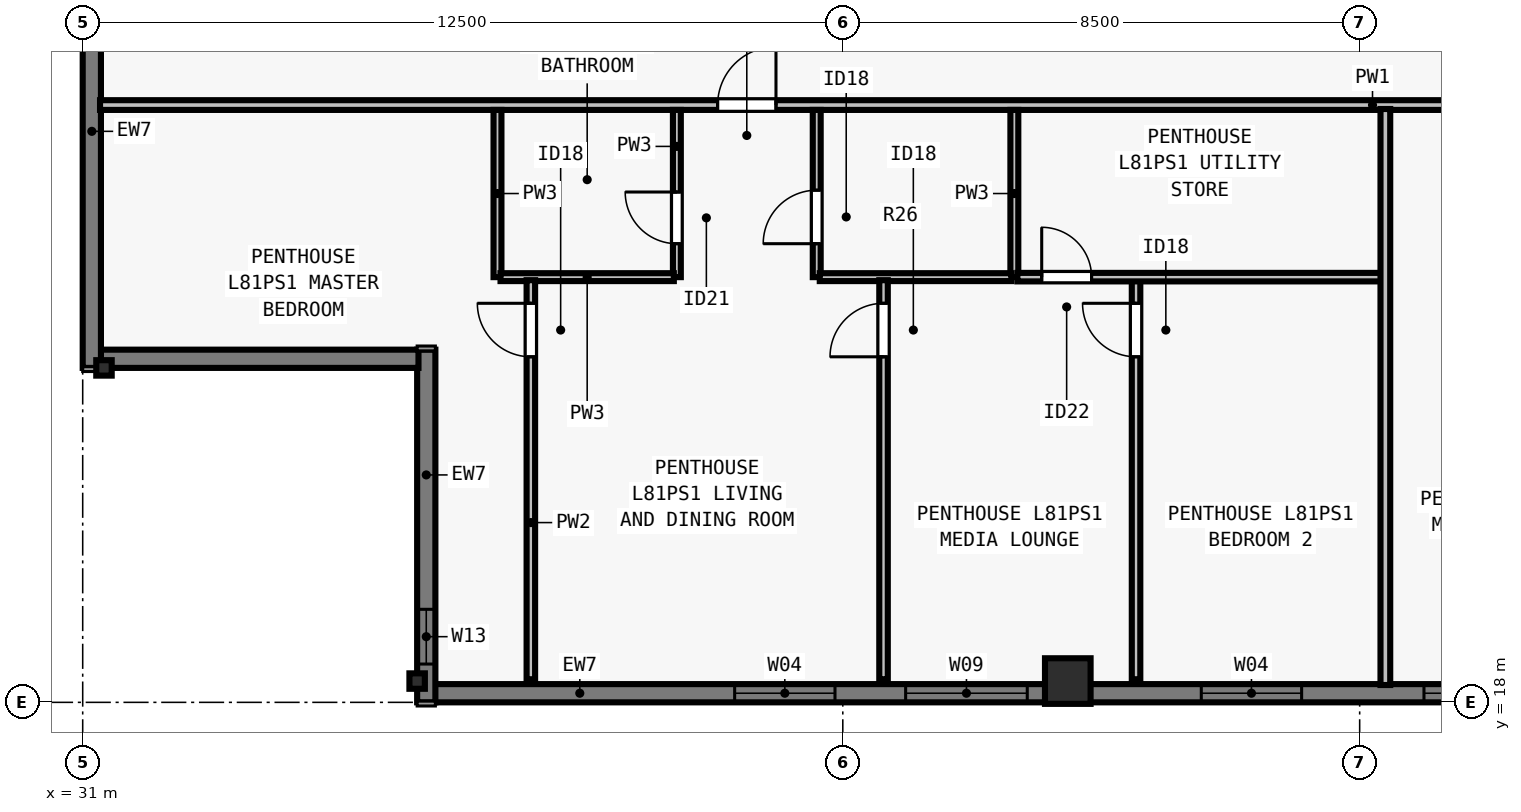
"""IFC4 building model, lengths in metres.
Left out: names, types, materials, properties, quantities, classifications, styles, units other than length and angle.
Written with IfcOpenShell. Run it as: python <this file> out.ifc"""

import sys

from ifc_helpers import new_model, si_unit, direction, frame, frame_2d, origin, origin_2d, place, context, subcontext, project, spatial, rectangle, i_section, extrude, element, fill, save


model = new_model("IFC4")
c1 = context("Model", 3, precision=1e-05, world=origin(), true_north=direction((0.0, 1.0)))
c2 = subcontext(c1, "Body", "Model", "MODEL_VIEW")
j1 = project(units=[si_unit("LENGTHUNIT", "METRE"), si_unit("PLANEANGLEUNIT", "RADIAN")], contexts=[c1])
p1 = place(None, origin())
s1 = spatial("IfcSite", under=j1, at=p1, CompositionType="ELEMENT")
p2 = place(p1, origin())
s2 = spatial("IfcBuilding", under=s1, at=p2, CompositionType="ELEMENT")
p3 = place(p2, frame((0.0, 0.0, 294.5)))
s3 = spatial("IfcBuildingStorey", under=s2, at=p3, CompositionType="ELEMENT", Elevation=294.5)
p4 = place(p3, frame((36.5, 18.35, 0.0), z_axis=(0.0, 0.0, 1.0), x_axis=(1.0, 0.0, 0.0)))
e1 = element("IfcColumn", 1, at=p4, inside=s3, PredefinedType="COLUMN", context=c2, shape_type="SweptSolid", body=[
    extrude(i_section(OverallWidth=0.254, OverallDepth=0.254, WebThickness=0.009, FlangeThickness=0.014, FilletRadius=0.013, at=origin_2d()), origin(), (0.0, 0.0, 1.0), 3.5),
])
p5 = place(p3, frame((47.2, 18.35, 0.0), z_axis=(0.0, 0.0, 1.0), x_axis=(1.0, 0.0, 0.0)))
e2 = element("IfcColumn", 2, at=p5, inside=s3, PredefinedType="COLUMN", context=c2, shape_type="SweptSolid", body=[
    extrude(rectangle(XDim=0.75, YDim=0.75, at=origin_2d()), origin(), (0.0, 0.0, 1.0), 3.5),
])
p6 = place(p3, frame((31.35, 23.5, 0.0), z_axis=(0.0, 0.0, 1.0), x_axis=(0.0, 1.0, 0.0)))
e3 = element("IfcColumn", 3, at=p6, inside=s3, PredefinedType="COLUMN", context=c2, shape_type="SweptSolid", body=[
    extrude(i_section(OverallWidth=0.254, OverallDepth=0.254, WebThickness=0.009, FlangeThickness=0.014, FilletRadius=0.013, at=origin_2d()), origin(), (0.0, 0.0, 1.0), 3.5),
])
p7 = place(p3, frame((67.5, 18.15, 0.0), z_axis=(0.0, 0.0, 1.0), x_axis=(-1.0, 0.0, 0.0)))
e4 = element("IfcWall", 4, at=p7, inside=s3, PredefinedType="SOLIDWALL", context=c2, shape_type="SweptSolid", body=[
    extrude(rectangle(XDim=30.722, YDim=0.3, at=frame_2d((15.361, 0.0))), origin(), (0.0, 0.0, 1.0), 3.29),
])
p8 = place(p7, frame((4.769, 0.0, 0.8)))
e5 = element("IfcOpeningElement", 5, at=p8, cuts=e4, PredefinedType="OPENING", context=c2, shape_type="SweptSolid", body=[
    extrude(rectangle(XDim=2.0, YDim=1.758, at=frame_2d((1.0, 0.879))), frame((0.0, 0.16, 0.0), z_axis=(0.0, -1.0, 0.0), x_axis=(1.0, 0.0, 0.0)), (0.0, 0.0, 1.0), 0.32),
])
p9 = place(p7, frame((8.331, 0.0, 0.8)))
e6 = element("IfcOpeningElement", 6, at=p9, cuts=e4, PredefinedType="OPENING", context=c2, shape_type="SweptSolid", body=[
    extrude(rectangle(XDim=1.65, YDim=1.758, at=frame_2d((0.825, 0.879))), frame((0.0, 0.16, 0.0), z_axis=(0.0, -1.0, 0.0), x_axis=(1.0, 0.0, 0.0)), (0.0, 0.0, 1.0), 0.32),
])
p10 = place(p7, frame((12.442, 0.0, 0.8)))
e7 = element("IfcOpeningElement", 7, at=p10, cuts=e4, PredefinedType="OPENING", context=c2, shape_type="SweptSolid", body=[
    extrude(rectangle(XDim=2.0, YDim=1.758, at=frame_2d((1.0, 0.879))), frame((0.0, 0.16, 0.0), z_axis=(0.0, -1.0, 0.0), x_axis=(1.0, 0.0, 0.0)), (0.0, 0.0, 1.0), 0.32),
])
p11 = place(p7, frame((16.455, 0.0, 0.8)))
e8 = element("IfcOpeningElement", 8, at=p11, cuts=e4, PredefinedType="OPENING", context=c2, shape_type="SweptSolid", body=[
    extrude(rectangle(XDim=1.65, YDim=1.758, at=frame_2d((0.825, 0.879))), frame((0.0, 0.16, 0.0), z_axis=(0.0, -1.0, 0.0), x_axis=(1.0, 0.0, 0.0)), (0.0, 0.0, 1.0), 0.32),
])
p12 = place(p7, frame((20.967, 0.0, 0.8)))
e9 = element("IfcOpeningElement", 9, at=p12, cuts=e4, PredefinedType="OPENING", context=c2, shape_type="SweptSolid", body=[
    extrude(rectangle(XDim=2.0, YDim=1.758, at=frame_2d((1.0, 0.879))), frame((0.0, 0.16, 0.0), z_axis=(0.0, -1.0, 0.0), x_axis=(1.0, 0.0, 0.0)), (0.0, 0.0, 1.0), 0.32),
])
p13 = place(p7, frame((24.128, 0.0, 0.8)))
e10 = element("IfcOpeningElement", 10, at=p13, cuts=e4, PredefinedType="OPENING", context=c2, shape_type="SweptSolid", body=[
    extrude(rectangle(XDim=1.65, YDim=1.758, at=frame_2d((0.825, 0.879))), frame((0.0, 0.16, 0.0), z_axis=(0.0, -1.0, 0.0), x_axis=(1.0, 0.0, 0.0)), (0.0, 0.0, 1.0), 0.32),
])
p14 = place(p3, frame((36.65, 18.0, 0.0), z_axis=(0.0, 0.0, 1.0), x_axis=(0.0, 1.0, 0.0)))
e11 = element("IfcWall", 11, at=p14, inside=s3, PredefinedType="SOLIDWALL", context=c2, shape_type="SweptSolid", body=[
    extrude(rectangle(XDim=5.8, YDim=0.3, at=frame_2d((2.9, 0.0))), origin(), (0.0, 0.0, 1.0), 3.29),
])
p15 = place(p14, frame((0.63, 0.0, 0.8)))
e12 = element("IfcOpeningElement", 12, at=p15, cuts=e11, PredefinedType="OPENING", context=c2, shape_type="SweptSolid", body=[
    extrude(rectangle(XDim=0.9, YDim=1.75, at=frame_2d((0.45, 0.875))), frame((0.0, 0.16, 0.0), z_axis=(0.0, -1.0, 0.0), x_axis=(1.0, 0.0, 0.0)), (0.0, 0.0, 1.0), 0.32),
])
p16 = place(p3, frame((36.522, 23.65, 0.0), z_axis=(0.0, 0.0, 1.0), x_axis=(-1.0, 0.0, 0.0)))
e13 = element("IfcWall", 13, at=p16, inside=s3, PredefinedType="SOLIDWALL", context=c2, shape_type="SweptSolid", body=[
    extrude(rectangle(XDim=5.244, YDim=0.3, at=frame_2d((2.622, 0.0))), origin(), (0.0, 0.0, 1.0), 3.29),
])
p17 = place(p3, frame((31.15, 23.5, 0.0), z_axis=(0.0, 0.0, 1.0), x_axis=(0.0, 1.0, 0.0)))
e14 = element("IfcWall", 14, at=p17, inside=s3, PredefinedType="SOLIDWALL", context=c2, shape_type="SweptSolid", body=[
    extrude(rectangle(XDim=30.722, YDim=0.3, at=frame_2d((15.361, 0.0))), origin(), (0.0, 0.0, 1.0), 3.29),
])
p18 = place(p17, frame((7.93, 0.0, 0.8)))
e15 = element("IfcOpeningElement", 15, at=p18, cuts=e14, PredefinedType="OPENING", context=c2, shape_type="SweptSolid", body=[
    extrude(rectangle(XDim=1.65, YDim=1.758, at=frame_2d((0.825, 0.879))), frame((0.0, 0.16, 0.0), z_axis=(0.0, -1.0, 0.0), x_axis=(1.0, 0.0, 0.0)), (0.0, 0.0, 1.0), 0.32),
])
p19 = place(p17, frame((12.442, 0.0, 0.8)))
e16 = element("IfcOpeningElement", 16, at=p19, cuts=e14, PredefinedType="OPENING", context=c2, shape_type="SweptSolid", body=[
    extrude(rectangle(XDim=2.0, YDim=1.758, at=frame_2d((1.0, 0.879))), frame((0.0, 0.16, 0.0), z_axis=(0.0, -1.0, 0.0), x_axis=(1.0, 0.0, 0.0)), (0.0, 0.0, 1.0), 0.32),
])
p20 = place(p17, frame((16.455, 0.0, 0.8)))
e17 = element("IfcOpeningElement", 17, at=p20, cuts=e14, PredefinedType="OPENING", context=c2, shape_type="SweptSolid", body=[
    extrude(rectangle(XDim=1.65, YDim=1.758, at=frame_2d((0.825, 0.879))), frame((0.0, 0.16, 0.0), z_axis=(0.0, -1.0, 0.0), x_axis=(1.0, 0.0, 0.0)), (0.0, 0.0, 1.0), 0.32),
])
p21 = place(p17, frame((20.967, 0.0, 0.8)))
e18 = element("IfcOpeningElement", 18, at=p21, cuts=e14, PredefinedType="OPENING", context=c2, shape_type="SweptSolid", body=[
    extrude(rectangle(XDim=2.0, YDim=1.758, at=frame_2d((1.0, 0.879))), frame((0.0, 0.16, 0.0), z_axis=(0.0, -1.0, 0.0), x_axis=(1.0, 0.0, 0.0)), (0.0, 0.0, 1.0), 0.32),
])
p22 = place(p17, frame((24.579, 0.0, 0.8)))
e19 = element("IfcOpeningElement", 19, at=p22, cuts=e14, PredefinedType="OPENING", context=c2, shape_type="SweptSolid", body=[
    extrude(rectangle(XDim=1.65, YDim=1.758, at=frame_2d((0.825, 0.879))), frame((0.0, 0.16, 0.0), z_axis=(0.0, -1.0, 0.0), x_axis=(1.0, 0.0, 0.0)), (0.0, 0.0, 1.0), 0.32),
])
p23 = place(p17, frame((27.11, 0.0, 0.8)))
e20 = element("IfcOpeningElement", 20, at=p23, cuts=e14, PredefinedType="OPENING", context=c2, shape_type="SweptSolid", body=[
    extrude(rectangle(XDim=0.9, YDim=1.75, at=frame_2d((0.45, 0.875))), frame((0.0, 0.16, 0.0), z_axis=(0.0, -1.0, 0.0), x_axis=(1.0, 0.0, 0.0)), (0.0, 0.0, 1.0), 0.32),
])
p24 = place(p3, frame((31.285, 27.823, 0.0), z_axis=(0.0, 0.0, 1.0), x_axis=(1.0, 0.0, 0.0)))
e21 = element("IfcWall", 21, at=p24, inside=s3, PredefinedType="PARTITIONING", context=c2, shape_type="SweptSolid", body=[
    extrude(rectangle(XDim=41.3, YDim=0.16, at=frame_2d((20.65, 0.0))), origin(), (0.0, 0.0, 1.0), 3.009),
])
p25 = place(p24, frame((10.156, 0.0, 0.0)))
e22 = element("IfcOpeningElement", 22, at=p25, cuts=e21, PredefinedType="OPENING", context=c2, shape_type="SweptSolid", body=[
    extrude(rectangle(XDim=0.96, YDim=2.18, at=frame_2d((0.48, 1.09))), frame((0.0, 0.09, 0.0), z_axis=(0.0, -1.0, 0.0), x_axis=(1.0, 0.0, 0.0)), (0.0, 0.0, 1.0), 0.18),
])
p26 = place(p24, frame((30.736, 0.0, 0.0)))
e23 = element("IfcOpeningElement", 23, at=p26, cuts=e21, PredefinedType="OPENING", context=c2, shape_type="SweptSolid", body=[
    extrude(rectangle(XDim=0.96, YDim=2.18, at=frame_2d((0.48, 1.09))), frame((0.0, 0.09, 0.0), z_axis=(0.0, -1.0, 0.0), x_axis=(1.0, 0.0, 0.0)), (0.0, 0.0, 1.0), 0.18),
])
p27 = place(p3, frame((37.821, 24.992, 0.0), z_axis=(0.0, 0.0, 1.0), x_axis=(0.0, 1.0, 0.0)))
e24 = element("IfcWall", 24, at=p27, inside=s3, PredefinedType="PLUMBINGWALL", context=c2, shape_type="SweptSolid", body=[
    extrude(rectangle(XDim=2.75, YDim=0.13, at=frame_2d((1.375, 0.0))), origin(), (0.0, 0.0, 1.0), 3.29),
])
p28 = place(p3, frame((40.771, 24.992, 0.0), z_axis=(0.0, 0.0, 1.0), x_axis=(0.0, 1.0, 0.0)))
e25 = element("IfcWall", 25, at=p28, inside=s3, PredefinedType="PLUMBINGWALL", context=c2, shape_type="SweptSolid", body=[
    extrude(rectangle(XDim=2.75, YDim=0.13, at=frame_2d((1.375, 0.0))), origin(), (0.0, 0.0, 1.0), 2.653),
])
p29 = place(p28, frame((0.55, 0.0, 0.0)))
e26 = element("IfcOpeningElement", 26, at=p29, cuts=e25, PredefinedType="OPENING", context=c2, shape_type="SweptSolid", body=[
    extrude(rectangle(XDim=0.85, YDim=2.08, at=frame_2d((0.425, 1.04))), frame((0.0, 0.075, 0.0), z_axis=(0.0, -1.0, 0.0), x_axis=(1.0, 0.0, 0.0)), (0.0, 0.0, 1.0), 0.15),
])
p30 = place(p3, frame((37.871, 24.992, 0.0), z_axis=(0.0, 0.0, 1.0), x_axis=(1.0, 0.0, 0.0)))
e27 = element("IfcWall", 27, at=p30, inside=s3, PredefinedType="PLUMBINGWALL", context=c2, shape_type="SweptSolid", body=[
    extrude(rectangle(XDim=2.85, YDim=0.13, at=frame_2d((1.425, 0.0))), origin(), (0.0, 0.0, 1.0), 3.29),
])
p31 = place(p3, frame((46.321, 24.992, 0.0), z_axis=(0.0, 0.0, 1.0), x_axis=(0.0, 1.0, 0.0)))
e28 = element("IfcWall", 28, at=p31, inside=s3, PredefinedType="PLUMBINGWALL", context=c2, shape_type="SweptSolid", body=[
    extrude(rectangle(XDim=2.75, YDim=0.13, at=frame_2d((1.375, 0.0))), origin(), (0.0, 0.0, 1.0), 3.29),
])
p32 = place(p3, frame((43.071, 24.992, 0.0), z_axis=(0.0, 0.0, 1.0), x_axis=(0.0, 1.0, 0.0)))
e29 = element("IfcWall", 29, at=p32, inside=s3, PredefinedType="PLUMBINGWALL", context=c2, shape_type="SweptSolid", body=[
    extrude(rectangle(XDim=2.75, YDim=0.13, at=frame_2d((1.375, 0.0))), origin(), (0.0, 0.0, 1.0), 3.29),
])
p33 = place(p32, frame((0.55, 0.0, 0.0)))
e30 = element("IfcOpeningElement", 30, at=p33, cuts=e29, PredefinedType="OPENING", context=c2, shape_type="SweptSolid", body=[
    extrude(rectangle(XDim=0.88, YDim=2.1, at=frame_2d((0.44, 1.05))), frame((0.0, 0.075, 0.0), z_axis=(0.0, -1.0, 0.0), x_axis=(1.0, 0.0, 0.0)), (0.0, 0.0, 1.0), 0.15),
])
p34 = place(p3, frame((43.121, 24.992, 0.0), z_axis=(0.0, 0.0, 1.0), x_axis=(1.0, 0.0, 0.0)))
e31 = element("IfcWall", 31, at=p34, inside=s3, PredefinedType="PLUMBINGWALL", context=c2, shape_type="SweptSolid", body=[
    extrude(rectangle(XDim=3.15, YDim=0.13, at=frame_2d((1.575, 0.0))), origin(), (0.0, 0.0, 1.0), 3.29),
])
p35 = place(p3, frame((38.37, 18.38, 0.0), z_axis=(0.0, 0.0, 1.0), x_axis=(0.0, 1.0, 0.0)))
e32 = element("IfcWall", 32, at=p35, inside=s3, PredefinedType="PARTITIONING", context=c2, shape_type="SweptSolid", body=[
    extrude(rectangle(XDim=6.562, YDim=0.14, at=frame_2d((3.281, 0.0))), origin(), (0.0, 0.0, 1.0), 2.653),
])
p36 = place(p35, frame((5.302, 0.0, 0.0)))
e33 = element("IfcOpeningElement", 33, at=p36, cuts=e32, PredefinedType="OPENING", context=c2, shape_type="SweptSolid", body=[
    extrude(rectangle(XDim=0.88, YDim=2.1, at=frame_2d((0.44, 1.05))), frame((0.0, 0.08, 0.0), z_axis=(0.0, -1.0, 0.0), x_axis=(1.0, 0.0, 0.0)), (0.0, 0.0, 1.0), 0.16),
])
p37 = place(p3, frame((48.323, 18.38, 0.0), z_axis=(0.0, 0.0, 1.0), x_axis=(0.0, 1.0, 0.0)))
e34 = element("IfcWall", 34, at=p37, inside=s3, PredefinedType="PARTITIONING", context=c2, shape_type="SweptSolid", body=[
    extrude(rectangle(XDim=6.653, YDim=0.14, at=frame_2d((3.326, 0.0))), origin(), (0.0, 0.0, 1.0), 3.009),
])
p38 = place(p37, frame((5.302, 0.0, 0.0)))
e35 = element("IfcOpeningElement", 35, at=p38, cuts=e34, PredefinedType="OPENING", context=c2, shape_type="SweptSolid", body=[
    extrude(rectangle(XDim=0.88, YDim=2.1, at=frame_2d((0.44, 1.05))), frame((0.0, 0.08, 0.0), z_axis=(0.0, -1.0, 0.0), x_axis=(1.0, 0.0, 0.0)), (0.0, 0.0, 1.0), 0.16),
])
p39 = place(p3, frame((46.371, 24.992, 0.0), z_axis=(0.0, 0.0, 1.0), x_axis=(1.0, 0.0, 0.0)))
e36 = element("IfcWall", 36, at=p39, inside=s3, PredefinedType="PARTITIONING", context=c2, shape_type="SweptSolid", body=[
    extrude(rectangle(XDim=6.101, YDim=0.14, at=frame_2d((3.051, 0.0))), origin(), (0.0, 0.0, 1.0), 3.29),
])
p40 = place(p39, frame((0.4, 0.0, 0.0)))
e37 = element("IfcOpeningElement", 37, at=p40, cuts=e36, PredefinedType="OPENING", context=c2, shape_type="SweptSolid", body=[
    extrude(rectangle(XDim=0.82, YDim=2.1, at=frame_2d((0.41, 1.05))), frame((0.0, 0.08, 0.0), z_axis=(0.0, -1.0, 0.0), x_axis=(1.0, 0.0, 0.0)), (0.0, 0.0, 1.0), 0.16),
])
p41 = place(p3, frame((44.17, 18.38, 0.0), z_axis=(0.0, 0.0, 1.0), x_axis=(0.0, 1.0, 0.0)))
e38 = element("IfcWall", 38, at=p41, inside=s3, PredefinedType="PARTITIONING", context=c2, shape_type="SweptSolid", body=[
    extrude(rectangle(XDim=6.562, YDim=0.14, at=frame_2d((3.281, 0.0))), origin(), (0.0, 0.0, 1.0), 3.29),
])
p42 = place(p41, frame((5.302, 0.0, 0.0)))
e39 = element("IfcOpeningElement", 39, at=p42, cuts=e38, PredefinedType="OPENING", context=c2, shape_type="SweptSolid", body=[
    extrude(rectangle(XDim=0.88, YDim=2.1, at=frame_2d((0.44, 1.05))), frame((0.0, 0.08, 0.0), z_axis=(0.0, -1.0, 0.0), x_axis=(1.0, 0.0, 0.0)), (0.0, 0.0, 1.0), 0.16),
])
p43 = place(p3, frame((52.423, 18.285, 0.0), z_axis=(0.0, 0.0, 1.0), x_axis=(0.0, 1.0, 0.0)))
e40 = element("IfcWall", 40, at=p43, inside=s3, PredefinedType="PARTITIONING", context=c2, shape_type="SweptSolid", body=[
    extrude(rectangle(XDim=9.473, YDim=0.16, at=frame_2d((4.736, 0.0))), origin(), (0.0, 0.0, 1.0), 3.009),
])
p44 = place(p10, origin())
e41 = element("IfcWindow", 41, at=p44, inside=s3, PartitioningType="SINGLE_PANEL", PredefinedType="WINDOW", context=c2, shape_type="SweptSolid", body=[
    extrude(rectangle(XDim=2.0, YDim=1.758, at=frame_2d((1.0, 0.879))), frame((0.0, -0.05, 0.0), z_axis=(0.0, -1.0, 0.0), x_axis=(1.0, 0.0, 0.0)), (0.0, 0.0, 1.0), 0.06),
])
fill(e7, e41)
p45 = place(p11, origin())
e42 = element("IfcWindow", 42, at=p45, inside=s3, PartitioningType="SINGLE_PANEL", PredefinedType="WINDOW", context=c2, shape_type="SweptSolid", body=[
    extrude(rectangle(XDim=1.65, YDim=1.758, at=frame_2d((0.825, 0.879))), frame((0.0, -0.05, 0.0), z_axis=(0.0, -1.0, 0.0), x_axis=(1.0, 0.0, 0.0)), (0.0, 0.0, 1.0), 0.06),
])
fill(e8, e42)
p46 = place(p12, origin())
e43 = element("IfcWindow", 43, at=p46, inside=s3, PartitioningType="SINGLE_PANEL", PredefinedType="WINDOW", context=c2, shape_type="SweptSolid", body=[
    extrude(rectangle(XDim=2.0, YDim=1.758, at=frame_2d((1.0, 0.879))), frame((0.0, -0.05, 0.0), z_axis=(0.0, -1.0, 0.0), x_axis=(1.0, 0.0, 0.0)), (0.0, 0.0, 1.0), 0.06),
])
fill(e9, e43)
p47 = place(p13, origin())
e44 = element("IfcWindow", 44, at=p47, inside=s3, PartitioningType="SINGLE_PANEL", PredefinedType="WINDOW", context=c2, shape_type="SweptSolid", body=[
    extrude(rectangle(XDim=1.65, YDim=1.758, at=frame_2d((0.825, 0.879))), frame((0.0, -0.05, 0.0), z_axis=(0.0, -1.0, 0.0), x_axis=(1.0, 0.0, 0.0)), (0.0, 0.0, 1.0), 0.06),
])
fill(e10, e44)
p48 = place(p15, origin())
e45 = element("IfcWindow", 45, at=p48, inside=s3, PartitioningType="SINGLE_PANEL", PredefinedType="WINDOW", context=c2, shape_type="SweptSolid", body=[
    extrude(rectangle(XDim=0.9, YDim=1.75, at=frame_2d((0.45, 0.875))), frame((0.0, -0.04, 0.0), z_axis=(0.0, -1.0, 0.0), x_axis=(1.0, 0.0, 0.0)), (0.0, 0.0, 1.0), 0.06),
])
fill(e12, e45)
p49 = place(p29, origin())
e46 = element("IfcDoor", 46, at=p49, inside=s3, OperationType="SINGLE_SWING_RIGHT", PredefinedType="DOOR", context=c2, shape_type="SweptSolid", body=[
    extrude(rectangle(XDim=0.85, YDim=2.08, at=frame_2d((0.425, 1.04))), frame((0.0, 0.025, 0.0), z_axis=(0.0, -1.0, 0.0), x_axis=(1.0, 0.0, 0.0)), (0.0, 0.0, 1.0), 0.05),
])
fill(e26, e46)
p50 = place(p33, origin())
e47 = element("IfcDoor", 47, at=p50, inside=s3, OperationType="SINGLE_SWING_LEFT", PredefinedType="DOOR", context=c2, shape_type="SweptSolid", body=[
    extrude(rectangle(XDim=0.88, YDim=2.1, at=frame_2d((0.44, 1.05))), frame((0.0, 0.025, 0.0), z_axis=(0.0, -1.0, 0.0), x_axis=(1.0, 0.0, 0.0)), (0.0, 0.0, 1.0), 0.05),
])
fill(e30, e47)
p51 = place(p36, origin())
e48 = element("IfcDoor", 48, at=p51, inside=s3, OperationType="SINGLE_SWING_RIGHT", PredefinedType="DOOR", context=c2, shape_type="SweptSolid", body=[
    extrude(rectangle(XDim=0.88, YDim=2.1, at=frame_2d((0.44, 1.05))), frame((0.0, 0.025, 0.0), z_axis=(0.0, -1.0, 0.0), x_axis=(1.0, 0.0, 0.0)), (0.0, 0.0, 1.0), 0.05),
])
fill(e33, e48)
p52 = place(p40, origin())
e49 = element("IfcDoor", 49, at=p52, inside=s3, OperationType="SINGLE_SWING_LEFT", PredefinedType="DOOR", context=c2, shape_type="SweptSolid", body=[
    extrude(rectangle(XDim=0.82, YDim=2.1, at=frame_2d((0.41, 1.05))), frame((0.0, 0.025, 0.0), z_axis=(0.0, -1.0, 0.0), x_axis=(1.0, 0.0, 0.0)), (0.0, 0.0, 1.0), 0.05),
])
fill(e37, e49)
p53 = place(p38, origin())
e50 = element("IfcDoor", 50, at=p53, inside=s3, OperationType="SINGLE_SWING_RIGHT", PredefinedType="DOOR", context=c2, shape_type="SweptSolid", body=[
    extrude(rectangle(XDim=0.88, YDim=2.1, at=frame_2d((0.44, 1.05))), frame((0.0, 0.025, 0.0), z_axis=(0.0, -1.0, 0.0), x_axis=(1.0, 0.0, 0.0)), (0.0, 0.0, 1.0), 0.05),
])
fill(e35, e50)
p54 = place(p42, origin())
e51 = element("IfcDoor", 51, at=p54, inside=s3, OperationType="SINGLE_SWING_LEFT", PredefinedType="DOOR", context=c2, shape_type="SweptSolid", body=[
    extrude(rectangle(XDim=0.88, YDim=2.1, at=frame_2d((0.44, 1.05))), frame((0.0, 0.025, 0.0), z_axis=(0.0, -1.0, 0.0), x_axis=(1.0, 0.0, 0.0)), (0.0, 0.0, 1.0), 0.05),
])
fill(e39, e51)
p55 = place(p25, origin())
e52 = element("IfcDoor", 52, at=p55, inside=s3, OperationType="SINGLE_SWING_RIGHT", PredefinedType="DOOR", context=c2, shape_type="SweptSolid", body=[
    extrude(rectangle(XDim=0.96, YDim=2.18, at=frame_2d((0.48, 1.09))), frame((0.0, 0.025, 0.0), z_axis=(0.0, -1.0, 0.0), x_axis=(1.0, 0.0, 0.0)), (0.0, 0.0, 1.0), 0.05),
])
fill(e22, e52)
save(model, sys.argv[1])
